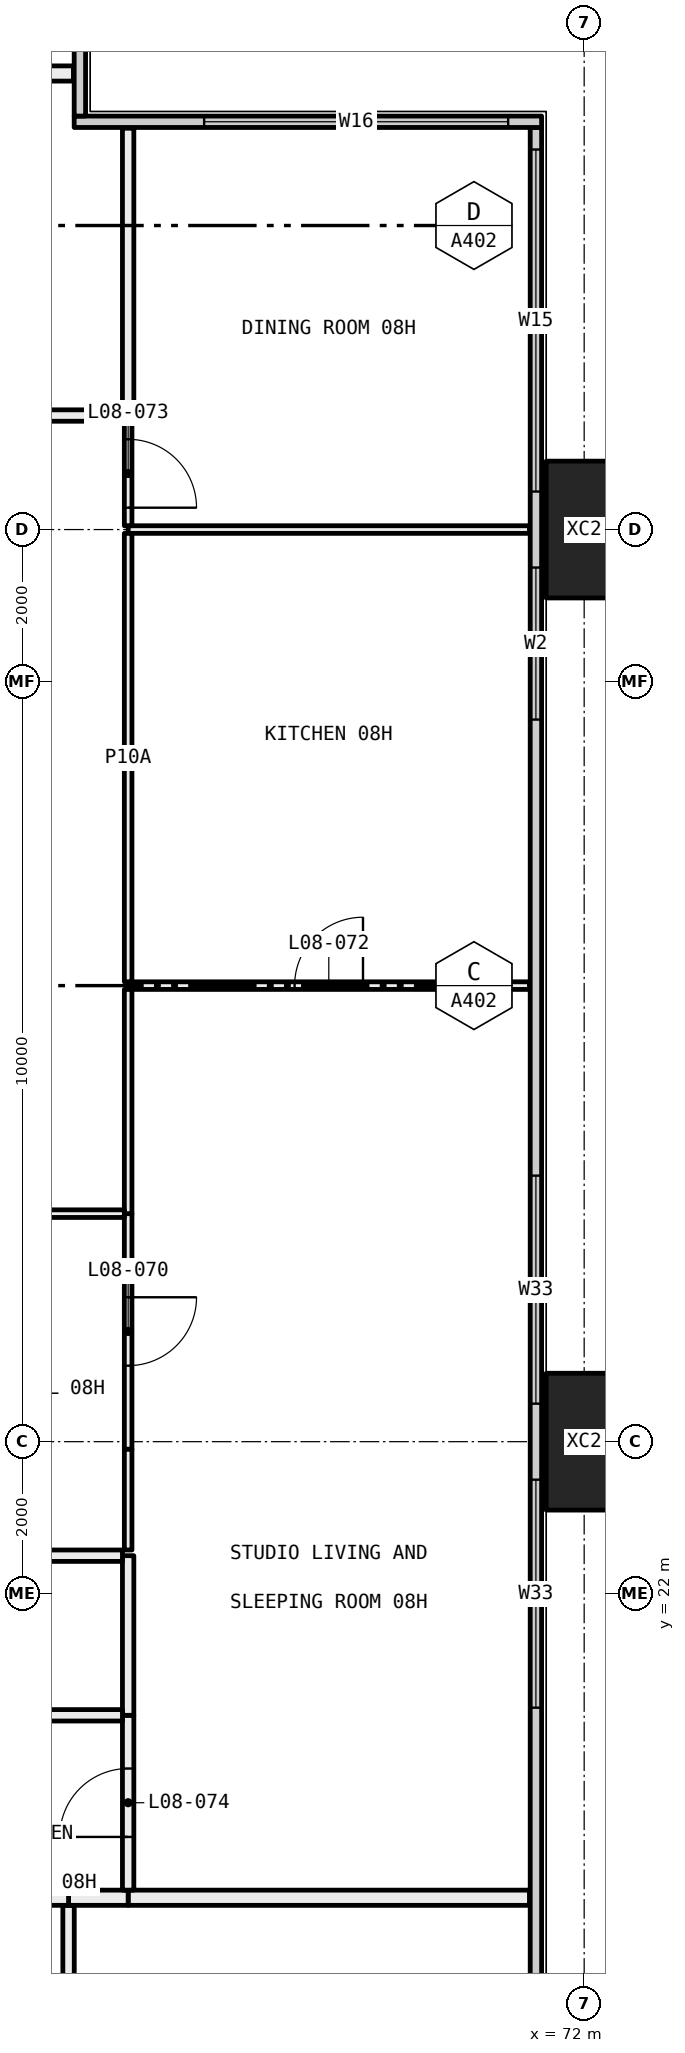
"""IFC4 building model, lengths in metres.
Left out: names, types, materials, properties, quantities, classifications, styles, units other than length and angle.
Written with IfcOpenShell. Run it as: python <this file> out.ifc"""

import sys

from ifc_helpers import new_model, si_unit, direction, frame, frame_2d, origin, origin_2d, place, context, subcontext, project, spatial, rectangle, hollow_rectangle, extrude, element, fill, save


model = new_model("IFC4")
c1 = context("Model", 3, precision=1e-05, world=origin(), true_north=direction((0.0, 1.0)))
c2 = subcontext(c1, "Body", "Model", "MODEL_VIEW")
j1 = project(units=[si_unit("LENGTHUNIT", "METRE"), si_unit("PLANEANGLEUNIT", "RADIAN")], contexts=[c1])
p1 = place(None, origin())
s1 = spatial("IfcSite", under=j1, at=p1, CompositionType="ELEMENT")
p2 = place(p1, origin())
s2 = spatial("IfcBuilding", under=s1, at=p2, CompositionType="ELEMENT")
p3 = place(p2, frame((0.0, 0.0, 40.35)))
s3 = spatial("IfcBuildingStorey", under=s2, at=p3, CompositionType="ELEMENT", Elevation=40.35)
for number, where, z_axis, x_axis in (
    (1, (72.0, 24.0, -0.4), (0.0, 0.0, 1.0), (0.0, 1.0, 0.0)),
    (2, (72.0, 36.0, -0.4), (0.0, 0.0, 1.0), (0.0, 1.0, 0.0)),
):
    element("IfcColumn", number, at=place(p3, frame(where, z_axis=z_axis, x_axis=x_axis)), inside=s3, PredefinedType="COLUMN", context=c2, shape_type="SweptSolid", body=[
        extrude(hollow_rectangle(XDim=1.8, YDim=1.0, WallThickness=0.07, at=origin_2d()), origin(), (0.0, 0.0, 1.0), 3.45),
    ])
p4 = place(p3, frame((71.365, 6.71, 0.0), z_axis=(0.0, 0.0, 1.0), x_axis=(0.0, 1.0, 0.0)))
e3 = element("IfcWall", 3, at=p4, inside=s3, PredefinedType="ELEMENTEDWALL", context=c2, shape_type="SweptSolid", body=[
    extrude(rectangle(XDim=34.58, YDim=0.15, at=frame_2d((17.29, 0.0))), origin(), (0.0, 0.0, 1.0), 3.05),
])
p5 = place(p4, frame((0.29, 0.0, 0.45)))
e4 = element("IfcOpeningElement", 4, at=p5, cuts=e3, PredefinedType="OPENING", context=c2, shape_type="SweptSolid", body=[
    extrude(rectangle(XDim=4.5, YDim=2.55, at=frame_2d((2.25, 1.275))), frame((0.0, 0.085, 0.0), z_axis=(0.0, -1.0, 0.0), x_axis=(1.0, 0.0, 0.0)), (0.0, 0.0, 1.0), 0.17),
])
p6 = place(p4, frame((5.79, 0.0, 0.45)))
e5 = element("IfcOpeningElement", 5, at=p6, cuts=e3, PredefinedType="OPENING", context=c2, shape_type="SweptSolid", body=[
    extrude(rectangle(XDim=3.0, YDim=2.55, at=frame_2d((1.5, 1.275))), frame((0.0, 0.085, 0.0), z_axis=(0.0, -1.0, 0.0), x_axis=(1.0, 0.0, 0.0)), (0.0, 0.0, 1.0), 0.17),
])
p7 = place(p4, frame((13.79, 0.0, 0.45)))
e6 = element("IfcOpeningElement", 6, at=p7, cuts=e3, PredefinedType="OPENING", context=c2, shape_type="SweptSolid", body=[
    extrude(rectangle(XDim=3.0, YDim=2.55, at=frame_2d((1.5, 1.275))), frame((0.0, 0.085, 0.0), z_axis=(0.0, -1.0, 0.0), x_axis=(1.0, 0.0, 0.0)), (0.0, 0.0, 1.0), 0.17),
])
p8 = place(p4, frame((17.79, 0.0, 0.45)))
e7 = element("IfcOpeningElement", 7, at=p8, cuts=e3, PredefinedType="OPENING", context=c2, shape_type="SweptSolid", body=[
    extrude(rectangle(XDim=3.0, YDim=2.55, at=frame_2d((1.5, 1.275))), frame((0.0, 0.085, 0.0), z_axis=(0.0, -1.0, 0.0), x_axis=(1.0, 0.0, 0.0)), (0.0, 0.0, 1.0), 0.17),
])
p9 = place(p4, frame((26.79, 0.0, 0.45)))
e8 = element("IfcOpeningElement", 8, at=p9, cuts=e3, PredefinedType="OPENING", context=c2, shape_type="SweptSolid", body=[
    extrude(rectangle(XDim=2.0, YDim=2.55, at=frame_2d((1.0, 1.275))), frame((0.0, 0.085, 0.0), z_axis=(0.0, -1.0, 0.0), x_axis=(1.0, 0.0, 0.0)), (0.0, 0.0, 1.0), 0.17),
])
p10 = place(p4, frame((29.79, 0.0, 0.45)))
e9 = element("IfcOpeningElement", 9, at=p10, cuts=e3, PredefinedType="OPENING", context=c2, shape_type="SweptSolid", body=[
    extrude(rectangle(XDim=4.5, YDim=2.55, at=frame_2d((2.25, 1.275))), frame((0.0, 0.085, 0.0), z_axis=(0.0, -1.0, 0.0), x_axis=(1.0, 0.0, 0.0)), (0.0, 0.0, 1.0), 0.17),
])
p11 = place(p3, frame((65.29, 41.365, 0.0), z_axis=(0.0, 0.0, 1.0), x_axis=(1.0, 0.0, 0.0)))
e10 = element("IfcWall", 10, at=p11, inside=s3, PredefinedType="ELEMENTEDWALL", context=c2, shape_type="SweptSolid", body=[
    extrude(rectangle(XDim=6.15, YDim=0.15, at=frame_2d((3.075, 0.0))), origin(), (0.0, 0.0, 1.0), 3.05),
])
p12 = place(p11, frame((1.71, 0.0, 0.45)))
e11 = element("IfcOpeningElement", 11, at=p12, cuts=e10, PredefinedType="OPENING", context=c2, shape_type="SweptSolid", body=[
    extrude(rectangle(XDim=4.0, YDim=2.55, at=frame_2d((2.0, 1.275))), frame((0.0, 0.085, 0.0), z_axis=(0.0, -1.0, 0.0), x_axis=(1.0, 0.0, 0.0)), (0.0, 0.0, 1.0), 0.17),
])
p13 = place(p3, frame((65.365, 41.44, 0.0), z_axis=(0.0, 0.0, 1.0), x_axis=(0.0, 1.0, 0.0)))
e12 = element("IfcWall", 12, at=p13, inside=s3, PredefinedType="ELEMENTEDWALL", context=c2, shape_type="SweptSolid", body=[
    extrude(rectangle(XDim=5.85, YDim=0.15, at=frame_2d((2.925, 0.0))), origin(), (0.0, 0.0, 1.0), 3.05),
])
p14 = place(p13, frame((1.56, 0.0, 0.45)))
e13 = element("IfcOpeningElement", 13, at=p14, cuts=e12, PredefinedType="OPENING", context=c2, shape_type="SweptSolid", body=[
    extrude(rectangle(XDim=4.0, YDim=2.55, at=frame_2d((2.0, 1.275))), frame((0.0, 0.085, 0.0), z_axis=(0.0, -1.0, 0.0), x_axis=(1.0, 0.0, 0.0)), (0.0, 0.0, 1.0), 0.17),
])
p15 = place(p3, frame((65.216, 17.9, 0.0), z_axis=(0.0, 0.0, 1.0), x_axis=(0.0, -1.0, 0.0)))
e14 = element("IfcWall", 14, at=p15, inside=s3, PredefinedType="PARTITIONING", context=c2, shape_type="SweptSolid", body=[
    extrude(rectangle(XDim=2.671, YDim=0.15, at=frame_2d((1.335, 0.0))), origin(), (0.0, 0.0, 1.0), 3.05),
])
p16 = place(p3, frame((71.28, 18.0, 0.0), z_axis=(0.0, 0.0, 1.0), x_axis=(-1.0, 0.0, 0.0)))
e15 = element("IfcWall", 15, at=p16, inside=s3, PredefinedType="PARTITIONING", context=c2, shape_type="SweptSolid", body=[
    extrude(rectangle(XDim=5.28, YDim=0.2, at=frame_2d((2.64, 0.0))), origin(), (0.0, 0.0, 1.0), 3.05),
])
p17 = place(p3, frame((66.0, 18.0, 0.0), z_axis=(0.0, 0.0, 1.0), x_axis=(-1.0, 0.0, 0.0)))
e16 = element("IfcWall", 16, at=p17, inside=s3, PredefinedType="PARTITIONING", context=c2, shape_type="SweptSolid", body=[
    extrude(rectangle(XDim=0.784, YDim=0.2, at=frame_2d((0.392, 0.0))), origin(), (0.0, 0.0, 1.0), 3.05),
])
p18 = place(p3, frame((65.216, 18.0, 0.0), z_axis=(0.0, 0.0, 1.0), x_axis=(-1.0, 0.0, 0.0)))
e17 = element("IfcWall", 17, at=p18, inside=s3, PredefinedType="PARTITIONING", context=c2, shape_type="SweptSolid", body=[
    extrude(rectangle(XDim=1.066, YDim=0.2, at=frame_2d((0.533, 0.0))), origin(), (0.0, 0.0, 1.0), 3.05),
])
p19 = place(p3, frame((61.9, 42.0, 0.0), z_axis=(0.0, 0.0, 1.0), x_axis=(1.0, 0.0, 0.0)))
e18 = element("IfcWall", 18, at=p19, inside=s3, PredefinedType="PARTITIONING", context=c2, shape_type="SweptSolid", body=[
    extrude(rectangle(XDim=3.38, YDim=0.2, at=frame_2d((1.69, 0.0))), origin(), (0.0, 0.0, 1.0), 3.05),
])
p20 = place(p3, frame((71.28, 30.0, 0.0), z_axis=(0.0, 0.0, 1.0), x_axis=(-1.0, 0.0, 0.0)))
e19 = element("IfcWall", 19, at=p20, inside=s3, PredefinedType="PARTITIONING", context=c2, shape_type="SweptSolid", body=[
    extrude(rectangle(XDim=5.28, YDim=0.1, at=frame_2d((2.64, 0.0))), origin(), (0.0, 0.0, 1.0), 3.05),
])
p21 = place(p20, frame((2.19, 0.0, 0.0)))
e20 = element("IfcOpeningElement", 20, at=p21, cuts=e19, PredefinedType="OPENING", context=c2, shape_type="SweptSolid", body=[
    extrude(rectangle(XDim=0.9, YDim=2.1, at=frame_2d((0.45, 1.05))), frame((0.0, 0.06, 0.0), z_axis=(0.0, -1.0, 0.0), x_axis=(1.0, 0.0, 0.0)), (0.0, 0.0, 1.0), 0.12),
])
p22 = place(p3, frame((66.0, 20.4, 0.0), z_axis=(0.0, 0.0, 1.0), x_axis=(0.0, -1.0, 0.0)))
e21 = element("IfcWall", 21, at=p22, inside=s3, PredefinedType="PARTITIONING", context=c2, shape_type="SweptSolid", body=[
    extrude(rectangle(XDim=2.3, YDim=0.15, at=frame_2d((1.15, 0.0))), origin(), (0.0, 0.0, 1.0), 3.05),
])
p23 = place(p22, frame((0.7, 0.0, 0.0)))
e22 = element("IfcOpeningElement", 22, at=p23, cuts=e21, PredefinedType="OPENING", context=c2, shape_type="SweptSolid", body=[
    extrude(rectangle(XDim=0.9, YDim=2.1, at=frame_2d((0.45, 1.05))), frame((0.0, 0.085, 0.0), z_axis=(0.0, -1.0, 0.0), x_axis=(1.0, 0.0, 0.0)), (0.0, 0.0, 1.0), 0.17),
])
p24 = place(p3, frame((66.0, 22.5, 0.0), z_axis=(0.0, 0.0, 1.0), x_axis=(0.0, -1.0, 0.0)))
e23 = element("IfcWall", 23, at=p24, inside=s3, PredefinedType="PARTITIONING", context=c2, shape_type="SweptSolid", body=[
    extrude(rectangle(XDim=2.1, YDim=0.15, at=frame_2d((1.05, 0.0))), origin(), (0.0, 0.0, 1.0), 3.05),
])
p25 = place(p3, frame((66.0, 27.0, 0.0), z_axis=(0.0, 0.0, 1.0), x_axis=(0.0, -1.0, 0.0)))
e24 = element("IfcWall", 24, at=p25, inside=s3, PredefinedType="PARTITIONING", context=c2, shape_type="SweptSolid", body=[
    extrude(rectangle(XDim=3.1, YDim=0.1, at=frame_2d((1.55, 0.0))), origin(), (0.0, 0.0, 1.0), 2.45),
])
p26 = place(p25, frame((1.1, 0.0, 0.0)))
e25 = element("IfcOpeningElement", 25, at=p26, cuts=e24, PredefinedType="OPENING", context=c2, shape_type="SweptSolid", body=[
    extrude(rectangle(XDim=0.9, YDim=2.1, at=frame_2d((0.45, 1.05))), frame((0.0, 0.06, 0.0), z_axis=(0.0, -1.0, 0.0), x_axis=(1.0, 0.0, 0.0)), (0.0, 0.0, 1.0), 0.12),
])
p27 = place(p3, frame((66.0, 23.9, 0.0), z_axis=(0.0, 0.0, 1.0), x_axis=(0.0, -1.0, 0.0)))
e26 = element("IfcWall", 26, at=p27, inside=s3, PredefinedType="PARTITIONING", context=c2, shape_type="SweptSolid", body=[
    extrude(rectangle(XDim=1.325, YDim=0.1, at=frame_2d((0.663, 0.0))), origin(), (0.0, 0.0, 1.0), 3.05),
])
p28 = place(p3, frame((66.0, 29.95, 0.0), z_axis=(0.0, 0.0, 1.0), x_axis=(0.0, -1.0, 0.0)))
e27 = element("IfcWall", 27, at=p28, inside=s3, PredefinedType="PARTITIONING", context=c2, shape_type="SweptSolid", body=[
    extrude(rectangle(XDim=2.95, YDim=0.1, at=frame_2d((1.475, 0.0))), origin(), (0.0, 0.0, 1.0), 3.05),
])
p29 = place(p3, frame((71.28, 36.0, 0.0), z_axis=(0.0, 0.0, 1.0), x_axis=(-1.0, 0.0, 0.0)))
e28 = element("IfcWall", 28, at=p29, inside=s3, PredefinedType="PARTITIONING", context=c2, shape_type="SweptSolid", body=[
    extrude(rectangle(XDim=5.28, YDim=0.1, at=frame_2d((2.64, 0.0))), origin(), (0.0, 0.0, 1.0), 2.45),
])
p30 = place(p3, frame((66.0, 35.95, 0.0), z_axis=(0.0, 0.0, 1.0), x_axis=(0.0, -1.0, 0.0)))
e29 = element("IfcWall", 29, at=p30, inside=s3, PredefinedType="PARTITIONING", context=c2, shape_type="SweptSolid", body=[
    extrude(rectangle(XDim=5.9, YDim=0.1, at=frame_2d((2.95, 0.0))), origin(), (0.0, 0.0, 1.0), 2.45),
])
p31 = place(p3, frame((66.0, 37.425, 0.0), z_axis=(0.0, 0.0, 1.0), x_axis=(0.0, -1.0, 0.0)))
e30 = element("IfcWall", 30, at=p31, inside=s3, PredefinedType="PARTITIONING", context=c2, shape_type="SweptSolid", body=[
    extrude(rectangle(XDim=1.375, YDim=0.1, at=frame_2d((0.688, 0.0))), origin(), (0.0, 0.0, 1.0), 2.45),
])
p32 = place(p31, frame((0.238, 0.0, 0.0)))
e31 = element("IfcOpeningElement", 31, at=p32, cuts=e30, PredefinedType="OPENING", context=c2, shape_type="SweptSolid", body=[
    extrude(rectangle(XDim=0.9, YDim=2.1, at=frame_2d((0.45, 1.05))), frame((0.0, 0.06, 0.0), z_axis=(0.0, -1.0, 0.0), x_axis=(1.0, 0.0, 0.0)), (0.0, 0.0, 1.0), 0.12),
])
p33 = place(p3, frame((66.0, 41.28, 0.0), z_axis=(0.0, 0.0, 1.0), x_axis=(0.0, -1.0, 0.0)))
e32 = element("IfcWall", 32, at=p33, inside=s3, PredefinedType="PARTITIONING", context=c2, shape_type="SweptSolid", body=[
    extrude(rectangle(XDim=3.78, YDim=0.15, at=frame_2d((1.89, 0.0))), origin(), (0.0, 0.0, 1.0), 3.05),
])
p34 = place(p3, frame((65.925, 20.4, 0.0), z_axis=(0.0, 0.0, 1.0), x_axis=(-1.0, 0.0, 0.0)))
e33 = element("IfcWall", 33, at=p34, inside=s3, PredefinedType="PARTITIONING", context=c2, shape_type="SweptSolid", body=[
    extrude(rectangle(XDim=1.7, YDim=0.15, at=frame_2d((0.85, 0.0))), origin(), (0.0, 0.0, 1.0), 3.05),
])
p35 = place(p3, frame((65.925, 22.5, 0.0), z_axis=(0.0, 0.0, 1.0), x_axis=(-1.0, 0.0, 0.0)))
e34 = element("IfcWall", 34, at=p35, inside=s3, PredefinedType="PARTITIONING", context=c2, shape_type="SweptSolid", body=[
    extrude(rectangle(XDim=3.925, YDim=0.15, at=frame_2d((1.962, 0.0))), origin(), (0.0, 0.0, 1.0), 3.05),
])
p36 = place(p35, frame((1.512, 0.0, 0.0)))
e35 = element("IfcOpeningElement", 35, at=p36, cuts=e34, PredefinedType="OPENING", context=c2, shape_type="SweptSolid", body=[
    extrude(rectangle(XDim=0.9, YDim=2.1, at=frame_2d((0.45, 1.05))), frame((0.0, 0.085, 0.0), z_axis=(0.0, -1.0, 0.0), x_axis=(1.0, 0.0, 0.0)), (0.0, 0.0, 1.0), 0.17),
])
p37 = place(p3, frame((65.95, 27.0, 0.0), z_axis=(0.0, 0.0, 1.0), x_axis=(-1.0, 0.0, 0.0)))
e36 = element("IfcWall", 36, at=p37, inside=s3, PredefinedType="PARTITIONING", context=c2, shape_type="SweptSolid", body=[
    extrude(rectangle(XDim=3.95, YDim=0.1, at=frame_2d((1.975, 0.0))), origin(), (0.0, 0.0, 1.0), 3.05),
])
p38 = place(p37, frame((1.525, 0.0, 0.0)))
e37 = element("IfcOpeningElement", 37, at=p38, cuts=e36, PredefinedType="OPENING", context=c2, shape_type="SweptSolid", body=[
    extrude(rectangle(XDim=0.9, YDim=2.1, at=frame_2d((0.45, 1.05))), frame((0.0, 0.06, 0.0), z_axis=(0.0, -1.0, 0.0), x_axis=(1.0, 0.0, 0.0)), (0.0, 0.0, 1.0), 0.12),
])
p39 = place(p3, frame((65.925, 37.5, 0.0), z_axis=(0.0, 0.0, 1.0), x_axis=(-1.0, 0.0, 0.0)))
e38 = element("IfcWall", 38, at=p39, inside=s3, PredefinedType="PARTITIONING", context=c2, shape_type="SweptSolid", body=[
    extrude(rectangle(XDim=3.925, YDim=0.15, at=frame_2d((1.962, 0.0))), origin(), (0.0, 0.0, 1.0), 3.05),
])
p40 = place(p39, frame((1.512, 0.0, 0.0)))
e39 = element("IfcOpeningElement", 39, at=p40, cuts=e38, PredefinedType="OPENING", context=c2, shape_type="SweptSolid", body=[
    extrude(rectangle(XDim=0.9, YDim=2.1, at=frame_2d((0.45, 1.05))), frame((0.0, 0.085, 0.0), z_axis=(0.0, -1.0, 0.0), x_axis=(1.0, 0.0, 0.0)), (0.0, 0.0, 1.0), 0.17),
])
p41 = place(p7, origin())
e40 = element("IfcWindow", 40, at=p41, inside=s3, PartitioningType="SINGLE_PANEL", PredefinedType="WINDOW", context=c2, shape_type="SweptSolid", body=[
    extrude(rectangle(XDim=3.0, YDim=2.55, at=frame_2d((1.5, 1.275))), frame((0.0, 0.03, 0.0), z_axis=(0.0, -1.0, 0.0), x_axis=(1.0, 0.0, 0.0)), (0.0, 0.0, 1.0), 0.06),
])
fill(e6, e40)
p42 = place(p8, origin())
e41 = element("IfcWindow", 41, at=p42, inside=s3, PartitioningType="SINGLE_PANEL", PredefinedType="WINDOW", context=c2, shape_type="SweptSolid", body=[
    extrude(rectangle(XDim=3.0, YDim=2.55, at=frame_2d((1.5, 1.275))), frame((0.0, 0.03, 0.0), z_axis=(0.0, -1.0, 0.0), x_axis=(1.0, 0.0, 0.0)), (0.0, 0.0, 1.0), 0.06),
])
fill(e7, e41)
p43 = place(p9, origin())
e42 = element("IfcWindow", 42, at=p43, inside=s3, PartitioningType="SINGLE_PANEL", PredefinedType="WINDOW", context=c2, shape_type="SweptSolid", body=[
    extrude(rectangle(XDim=2.0, YDim=2.55, at=frame_2d((1.0, 1.275))), frame((0.0, 0.03, 0.0), z_axis=(0.0, -1.0, 0.0), x_axis=(1.0, 0.0, 0.0)), (0.0, 0.0, 1.0), 0.06),
])
fill(e8, e42)
p44 = place(p10, origin())
e43 = element("IfcWindow", 43, at=p44, inside=s3, PartitioningType="SINGLE_PANEL", PredefinedType="WINDOW", context=c2, shape_type="SweptSolid", body=[
    extrude(rectangle(XDim=4.5, YDim=2.55, at=frame_2d((2.25, 1.275))), frame((0.0, 0.03, 0.0), z_axis=(0.0, -1.0, 0.0), x_axis=(1.0, 0.0, 0.0)), (0.0, 0.0, 1.0), 0.06),
])
fill(e9, e43)
p45 = place(p12, origin())
e44 = element("IfcWindow", 44, at=p45, inside=s3, PartitioningType="SINGLE_PANEL", PredefinedType="WINDOW", context=c2, shape_type="SweptSolid", body=[
    extrude(rectangle(XDim=4.0, YDim=2.55, at=frame_2d((2.0, 1.275))), frame((0.0, 0.03, 0.0), z_axis=(0.0, -1.0, 0.0), x_axis=(1.0, 0.0, 0.0)), (0.0, 0.0, 1.0), 0.06),
])
fill(e11, e44)
p46 = place(p26, origin())
e45 = element("IfcDoor", 45, at=p46, inside=s3, OperationType="SINGLE_SWING_RIGHT", PredefinedType="DOOR", context=c2, shape_type="SweptSolid", body=[
    extrude(rectangle(XDim=0.9, YDim=2.1, at=frame_2d((0.45, 1.05))), frame((0.0, 0.025, 0.0), z_axis=(0.0, -1.0, 0.0), x_axis=(1.0, 0.0, 0.0)), (0.0, 0.0, 1.0), 0.05),
])
fill(e25, e45)
p47 = place(p21, frame((0.9, 0.0, 0.0), x_axis=(-1.0, 0.0, 0.0)))
e46 = element("IfcDoor", 46, at=p47, inside=s3, OperationType="SINGLE_SWING_LEFT", PredefinedType="DOOR", context=c2, shape_type="SweptSolid", body=[
    extrude(rectangle(XDim=0.9, YDim=2.1, at=frame_2d((0.45, 1.05))), frame((0.0, 0.025, 0.0), z_axis=(0.0, -1.0, 0.0), x_axis=(1.0, 0.0, 0.0)), (0.0, 0.0, 1.0), 0.05),
])
fill(e20, e46)
p48 = place(p32, origin())
e47 = element("IfcDoor", 47, at=p48, inside=s3, OperationType="SINGLE_SWING_LEFT", PredefinedType="DOOR", context=c2, shape_type="SweptSolid", body=[
    extrude(rectangle(XDim=0.9, YDim=2.1, at=frame_2d((0.45, 1.05))), frame((0.0, 0.025, 0.0), z_axis=(0.0, -1.0, 0.0), x_axis=(1.0, 0.0, 0.0)), (0.0, 0.0, 1.0), 0.05),
])
fill(e31, e47)
p49 = place(p23, frame((0.9, 0.0, 0.0), x_axis=(-1.0, 0.0, 0.0)))
e48 = element("IfcDoor", 48, at=p49, inside=s3, OperationType="SINGLE_SWING_RIGHT", PredefinedType="DOOR", context=c2, shape_type="SweptSolid", body=[
    extrude(rectangle(XDim=0.9, YDim=2.1, at=frame_2d((0.45, 1.05))), frame((0.0, 0.025, 0.0), z_axis=(0.0, -1.0, 0.0), x_axis=(1.0, 0.0, 0.0)), (0.0, 0.0, 1.0), 0.05),
])
fill(e22, e48)
save(model, sys.argv[1])
